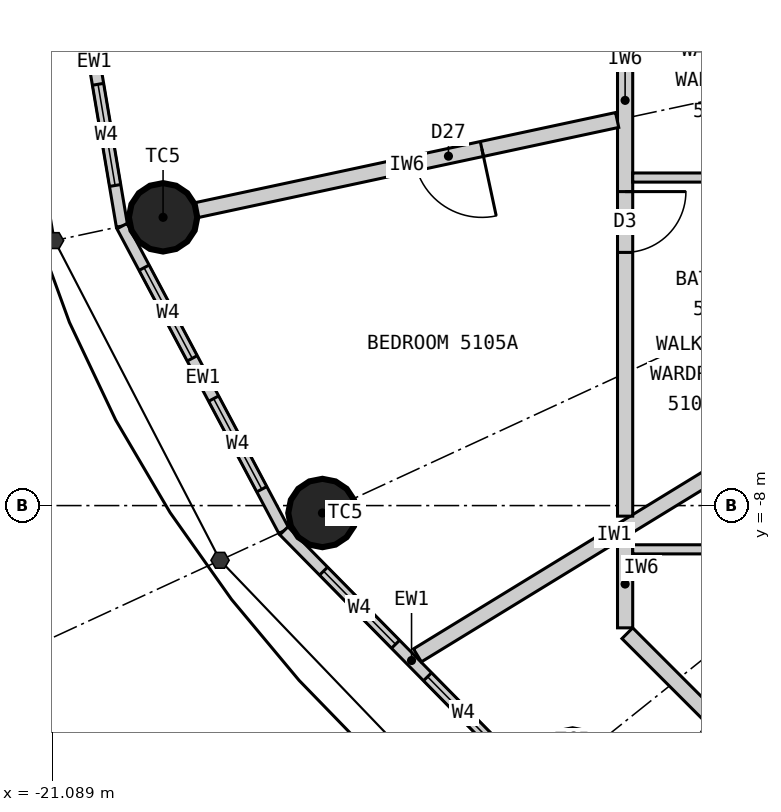
"""IFC4 building model, lengths in metres.
Left out: names, types, materials, properties, quantities, classifications, styles, units other than length and angle.
Written with IfcOpenShell. Run it as: python <this file> out.ifc"""

import sys

from ifc_helpers import new_model, si_unit, direction, frame, frame_2d, origin, origin_2d, place, context, subcontext, project, spatial, rectangle, circle, extrude, element, fill, save


model = new_model("IFC4")
c1 = context("Model", 3, precision=1e-05, world=origin(), true_north=direction((0.0, 1.0)))
c2 = subcontext(c1, "Body", "Model", "MODEL_VIEW")
j1 = project(units=[si_unit("LENGTHUNIT", "METRE"), si_unit("PLANEANGLEUNIT", "RADIAN")], contexts=[c1])
p1 = place(None, origin())
s1 = spatial("IfcSite", under=j1, at=p1, CompositionType="ELEMENT")
p2 = place(p1, origin())
s2 = spatial("IfcBuilding", under=s1, at=p2, CompositionType="ELEMENT")
p3 = place(p2, frame((0.0, 0.0, 192.9)))
s3 = spatial("IfcBuildingStorey", under=s2, at=p3, CompositionType="ELEMENT", Elevation=192.9)
for number, where, z_axis, x_axis in (
    (1, (-19.629, -4.208, 0.0), (0.0, 0.0, 1.0), (1.0, 0.0, 0.0)),
    (2, (-17.532, -8.098, 0.0), (0.0, 0.0, 1.0), (1.0, 0.0, 0.0)),
    (3, (-14.241, -11.393, 0.0), (0.0, 0.0, 1.0), (1.0, 0.0, 0.0)),
):
    element("IfcColumn", number, at=place(p3, frame(where, z_axis=z_axis, x_axis=x_axis)), inside=s3, PredefinedType="COLUMN", context=c2, shape_type="SweptSolid", body=[
        extrude(circle(Radius=0.45, at=origin_2d()), origin(), (0.0, 0.0, 1.0), 3.3),
    ])
p4 = place(p3, frame((-20.9, 0.0, 0.0), z_axis=(0.0, 0.0, 1.0), x_axis=(0.166538513568, -0.986034950445, 0.0)))
e4 = element("IfcWall", 4, at=p4, inside=s3, PredefinedType="ELEMENTEDWALL", context=c2, shape_type="SweptSolid", body=[
    extrude(rectangle(XDim=4.385, YDim=0.15, at=frame_2d((2.192, 0.0))), origin(), (0.0, 0.0, 1.0), 3.12),
])
p5 = place(p4, frame((0.542, 0.0, 0.9)))
e5 = element("IfcOpeningElement", 5, at=p5, cuts=e4, PredefinedType="OPENING", context=c2, shape_type="SweptSolid", body=[
    extrude(rectangle(XDim=1.35, YDim=1.9, at=frame_2d((0.675, 0.95))), frame((0.0, 0.085, 0.0), z_axis=(0.0, -1.0, 0.0), x_axis=(1.0, 0.0, 0.0)), (0.0, 0.0, 1.0), 0.17),
])
p6 = place(p4, frame((2.492, 0.0, 0.9)))
e6 = element("IfcOpeningElement", 6, at=p6, cuts=e4, PredefinedType="OPENING", context=c2, shape_type="SweptSolid", body=[
    extrude(rectangle(XDim=1.35, YDim=1.9, at=frame_2d((0.675, 0.95))), frame((0.0, 0.085, 0.0), z_axis=(0.0, -1.0, 0.0), x_axis=(1.0, 0.0, 0.0)), (0.0, 0.0, 1.0), 0.17),
])
p7 = place(p3, frame((-20.17, -4.323, 0.0), z_axis=(0.0, 0.0, 1.0), x_axis=(0.469256152955, -0.883062094597, 0.0)))
e7 = element("IfcWall", 7, at=p7, inside=s3, PredefinedType="ELEMENTEDWALL", context=c2, shape_type="SweptSolid", body=[
    extrude(rectangle(XDim=4.539, YDim=0.15, at=frame_2d((2.27, 0.0))), origin(), (0.0, 0.0, 1.0), 3.12),
])
p8 = place(p7, frame((0.62, 0.0, 0.9)))
e8 = element("IfcOpeningElement", 8, at=p8, cuts=e7, PredefinedType="OPENING", context=c2, shape_type="SweptSolid", body=[
    extrude(rectangle(XDim=1.35, YDim=1.9, at=frame_2d((0.675, 0.95))), frame((0.0, 0.085, 0.0), z_axis=(0.0, -1.0, 0.0), x_axis=(1.0, 0.0, 0.0)), (0.0, 0.0, 1.0), 0.17),
])
p9 = place(p7, frame((2.57, 0.0, 0.9)))
e9 = element("IfcOpeningElement", 9, at=p9, cuts=e7, PredefinedType="OPENING", context=c2, shape_type="SweptSolid", body=[
    extrude(rectangle(XDim=1.35, YDim=1.9, at=frame_2d((0.675, 0.95))), frame((0.0, 0.085, 0.0), z_axis=(0.0, -1.0, 0.0), x_axis=(1.0, 0.0, 0.0)), (0.0, 0.0, 1.0), 0.17),
])
p10 = place(p3, frame((-18.04, -8.332, 0.0), z_axis=(0.0, 0.0, 1.0), x_axis=(0.701527379618, -0.712642501993, 0.0)))
e10 = element("IfcWall", 10, at=p10, inside=s3, PredefinedType="ELEMENTEDWALL", context=c2, shape_type="SweptSolid", body=[
    extrude(rectangle(XDim=4.788, YDim=0.15, at=frame_2d((2.394, 0.0))), origin(), (0.0, 0.0, 1.0), 3.12),
])
p11 = place(p10, frame((0.744, 0.0, 0.9)))
e11 = element("IfcOpeningElement", 11, at=p11, cuts=e10, PredefinedType="OPENING", context=c2, shape_type="SweptSolid", body=[
    extrude(rectangle(XDim=1.35, YDim=1.9, at=frame_2d((0.675, 0.95))), frame((0.0, 0.085, 0.0), z_axis=(0.0, -1.0, 0.0), x_axis=(1.0, 0.0, 0.0)), (0.0, 0.0, 1.0), 0.17),
])
p12 = place(p10, frame((2.694, 0.0, 0.9)))
e12 = element("IfcOpeningElement", 12, at=p12, cuts=e10, PredefinedType="OPENING", context=c2, shape_type="SweptSolid", body=[
    extrude(rectangle(XDim=1.35, YDim=1.9, at=frame_2d((0.675, 0.95))), frame((0.0, 0.085, 0.0), z_axis=(0.0, -1.0, 0.0), x_axis=(1.0, 0.0, 0.0)), (0.0, 0.0, 1.0), 0.17),
])
p13 = place(p3, frame((-11.1, -6.797, 0.0), z_axis=(0.0, 0.0, 1.0), x_axis=(-0.852799818179, -0.522237943963, 0.0)))
e13 = element("IfcWall", 13, at=p13, inside=s3, PredefinedType="PARTITIONING", context=c2, shape_type="SweptSolid", body=[
    extrude(rectangle(XDim=6.077, YDim=0.2, at=frame_2d((3.039, 0.0))), origin(), (0.0, 0.0, 1.0), 3.12),
])
p14 = place(p3, frame((-13.55, 2.801, 0.0), z_axis=(0.0, 0.0, 1.0), x_axis=(0.0, -1.0, 0.0)))
e14 = element("IfcWall", 14, at=p14, inside=s3, PredefinedType="PARTITIONING", context=c2, shape_type="SweptSolid", body=[
    extrude(rectangle(XDim=10.94, YDim=0.2, at=frame_2d((5.47, 0.0))), origin(), (0.0, 0.0, 1.0), 3.12),
])
p15 = place(p14, frame((6.67, 0.0, 0.0)))
e15 = element("IfcOpeningElement", 15, at=p15, cuts=e14, PredefinedType="OPENING", context=c2, shape_type="SweptSolid", body=[
    extrude(rectangle(XDim=0.8, YDim=2.1, at=frame_2d((0.4, 1.05))), frame((0.0, 0.11, 0.0), z_axis=(0.0, -1.0, 0.0), x_axis=(1.0, 0.0, 0.0)), (0.0, 0.0, 1.0), 0.22),
])
p16 = place(p14, frame((2.872, 0.0, 0.0)))
e16 = element("IfcOpeningElement", 16, at=p16, cuts=e14, PredefinedType="OPENING", context=c2, shape_type="SweptSolid", body=[
    extrude(rectangle(XDim=0.9, YDim=2.1, at=frame_2d((0.45, 1.05))), frame((0.0, 0.11, 0.0), z_axis=(0.0, -1.0, 0.0), x_axis=(1.0, 0.0, 0.0)), (0.0, 0.0, 1.0), 0.22),
])
p17 = place(p3, frame((-13.655, -2.927, 0.0), z_axis=(0.0, 0.0, 1.0), x_axis=(-0.977790419294, -0.209585056568, 0.0)))
e17 = element("IfcWall", 17, at=p17, inside=s3, PredefinedType="PARTITIONING", context=c2, shape_type="SweptSolid", body=[
    extrude(rectangle(XDim=5.66, YDim=0.2, at=frame_2d((2.83, 0.0))), origin(), (0.0, 0.0, 1.0), 2.27),
])
p18 = place(p17, frame((1.82, 0.0, 0.0)))
e18 = element("IfcOpeningElement", 18, at=p18, cuts=e17, PredefinedType="OPENING", context=c2, shape_type="SweptSolid", body=[
    extrude(rectangle(XDim=0.9, YDim=2.1, at=frame_2d((0.45, 1.05))), frame((0.0, 0.11, 0.0), z_axis=(0.0, -1.0, 0.0), x_axis=(1.0, 0.0, 0.0)), (0.0, 0.0, 1.0), 0.22),
])
p19 = place(p3, frame((-11.1, -3.684, 0.0), z_axis=(0.0, 0.0, 1.0), x_axis=(-1.0, 0.0, 0.0)))
e19 = element("IfcWall", 19, at=p19, inside=s3, PredefinedType="PARTITIONING", context=c2, shape_type="SweptSolid", body=[
    extrude(rectangle(XDim=2.35, YDim=0.12, at=frame_2d((1.175, 0.0))), origin(), (0.0, 0.0, 1.0), 3.12),
])
p20 = place(p3, frame((-13.55, -8.456, 0.0), z_axis=(0.0, 0.0, 1.0), x_axis=(0.0, -1.0, 0.0)))
e20 = element("IfcWall", 20, at=p20, inside=s3, PredefinedType="PARTITIONING", context=c2, shape_type="SweptSolid", body=[
    extrude(rectangle(XDim=1.153, YDim=0.2, at=frame_2d((0.576, 0.0))), origin(), (0.0, 0.0, 1.0), 3.12),
])
p21 = place(p3, frame((-13.521, -9.679, 0.0), z_axis=(0.0, 0.0, 1.0), x_axis=(0.707106781187, -0.707106781187, 0.0)))
e21 = element("IfcWall", 21, at=p21, inside=s3, PredefinedType="PARTITIONING", context=c2, shape_type="SweptSolid", body=[
    extrude(rectangle(XDim=4.019, YDim=0.2, at=frame_2d((2.009, 0.0))), origin(), (0.0, 0.0, 1.0), 3.12),
])
p22 = place(p21, frame((1.57, 0.0, 0.0)))
e22 = element("IfcOpeningElement", 22, at=p22, cuts=e21, PredefinedType="OPENING", context=c2, shape_type="SweptSolid", body=[
    extrude(rectangle(XDim=0.9, YDim=2.1, at=frame_2d((0.45, 1.05))), frame((0.0, 0.11, 0.0), z_axis=(0.0, -1.0, 0.0), x_axis=(1.0, 0.0, 0.0)), (0.0, 0.0, 1.0), 0.22),
])
p23 = place(p3, frame((-11.1, -8.576, 0.0), z_axis=(0.0, 0.0, 1.0), x_axis=(-1.0, 0.0, 0.0)))
e23 = element("IfcWall", 23, at=p23, inside=s3, PredefinedType="PARTITIONING", context=c2, shape_type="SweptSolid", body=[
    extrude(rectangle(XDim=2.35, YDim=0.12, at=frame_2d((1.175, 0.0))), origin(), (0.0, 0.0, 1.0), 3.12),
])
p24 = place(p23, frame((0.22, 0.0, 0.0)))
e24 = element("IfcOpeningElement", 24, at=p24, cuts=e23, PredefinedType="OPENING", context=c2, shape_type="SweptSolid", body=[
    extrude(rectangle(XDim=0.9, YDim=2.1, at=frame_2d((0.45, 1.05))), frame((0.0, 0.07, 0.0), z_axis=(0.0, -1.0, 0.0), x_axis=(1.0, 0.0, 0.0)), (0.0, 0.0, 1.0), 0.14),
])
p25 = place(p6, origin())
e25 = element("IfcWindow", 25, at=p25, inside=s3, PartitioningType="SINGLE_PANEL", PredefinedType="WINDOW", context=c2, shape_type="SweptSolid", body=[
    extrude(rectangle(XDim=1.35, YDim=1.9, at=frame_2d((0.675, 0.95))), frame((0.0, 0.03, 0.0), z_axis=(0.0, -1.0, 0.0), x_axis=(1.0, 0.0, 0.0)), (0.0, 0.0, 1.0), 0.06),
])
fill(e6, e25)
p26 = place(p8, origin())
e26 = element("IfcWindow", 26, at=p26, inside=s3, PartitioningType="SINGLE_PANEL", PredefinedType="WINDOW", context=c2, shape_type="SweptSolid", body=[
    extrude(rectangle(XDim=1.35, YDim=1.9, at=frame_2d((0.675, 0.95))), frame((0.0, 0.03, 0.0), z_axis=(0.0, -1.0, 0.0), x_axis=(1.0, 0.0, 0.0)), (0.0, 0.0, 1.0), 0.06),
])
fill(e8, e26)
p27 = place(p9, origin())
e27 = element("IfcWindow", 27, at=p27, inside=s3, PartitioningType="SINGLE_PANEL", PredefinedType="WINDOW", context=c2, shape_type="SweptSolid", body=[
    extrude(rectangle(XDim=1.35, YDim=1.9, at=frame_2d((0.675, 0.95))), frame((0.0, 0.03, 0.0), z_axis=(0.0, -1.0, 0.0), x_axis=(1.0, 0.0, 0.0)), (0.0, 0.0, 1.0), 0.06),
])
fill(e9, e27)
p28 = place(p11, origin())
e28 = element("IfcWindow", 28, at=p28, inside=s3, PartitioningType="SINGLE_PANEL", PredefinedType="WINDOW", context=c2, shape_type="SweptSolid", body=[
    extrude(rectangle(XDim=1.35, YDim=1.9, at=frame_2d((0.675, 0.95))), frame((0.0, 0.03, 0.0), z_axis=(0.0, -1.0, 0.0), x_axis=(1.0, 0.0, 0.0)), (0.0, 0.0, 1.0), 0.06),
])
fill(e11, e28)
p29 = place(p12, origin())
e29 = element("IfcWindow", 29, at=p29, inside=s3, PartitioningType="SINGLE_PANEL", PredefinedType="WINDOW", context=c2, shape_type="SweptSolid", body=[
    extrude(rectangle(XDim=1.35, YDim=1.9, at=frame_2d((0.675, 0.95))), frame((0.0, 0.03, 0.0), z_axis=(0.0, -1.0, 0.0), x_axis=(1.0, 0.0, 0.0)), (0.0, 0.0, 1.0), 0.06),
])
fill(e12, e29)
p30 = place(p15, origin())
e30 = element("IfcDoor", 30, at=p30, inside=s3, OperationType="SINGLE_SWING_LEFT", PredefinedType="DOOR", context=c2, shape_type="SweptSolid", body=[
    extrude(rectangle(XDim=0.8, YDim=2.1, at=frame_2d((0.4, 1.05))), frame((0.0, 0.025, 0.0), z_axis=(0.0, -1.0, 0.0), x_axis=(1.0, 0.0, 0.0)), (0.0, 0.0, 1.0), 0.05),
])
fill(e15, e30)
p31 = place(p18, origin())
e31 = element("IfcDoor", 31, at=p31, inside=s3, OperationType="SINGLE_SWING_LEFT", PredefinedType="DOOR", context=c2, shape_type="SweptSolid", body=[
    extrude(rectangle(XDim=0.9, YDim=2.1, at=frame_2d((0.45, 1.05))), frame((0.0, 0.025, 0.0), z_axis=(0.0, -1.0, 0.0), x_axis=(1.0, 0.0, 0.0)), (0.0, 0.0, 1.0), 0.05),
])
fill(e18, e31)
save(model, sys.argv[1])
